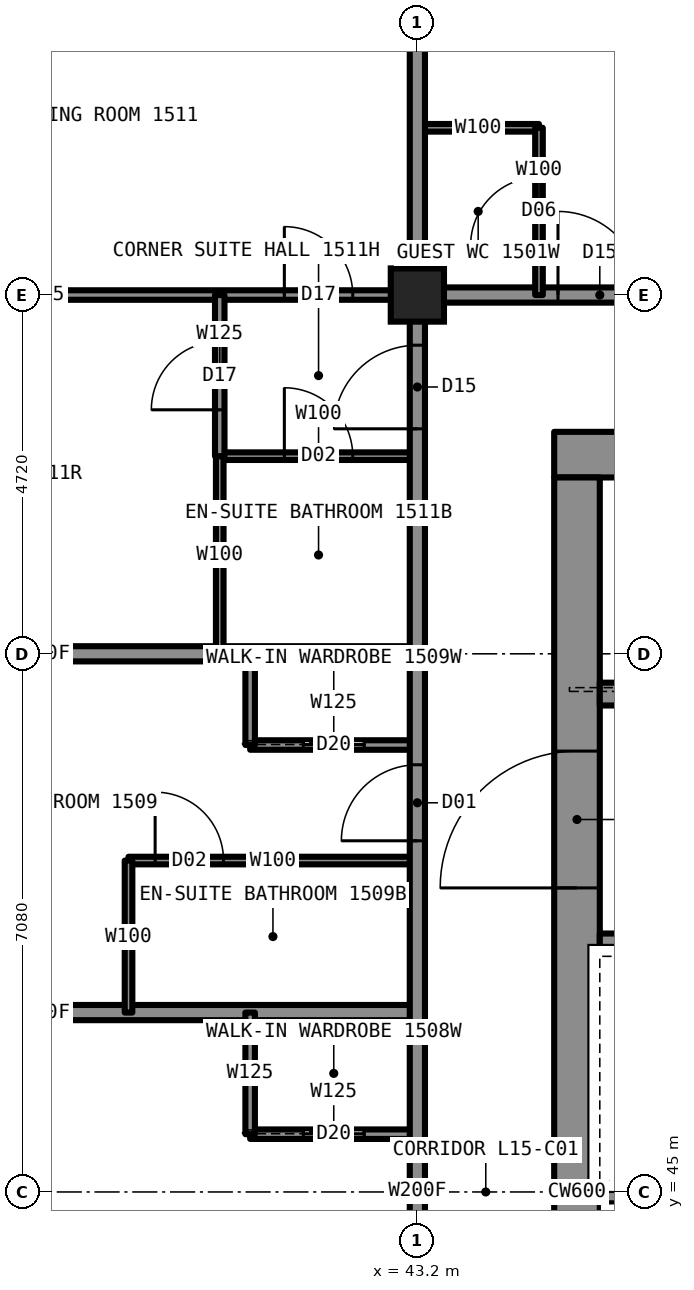
"""IFC4 building model, lengths in metres.
Left out: names, types, materials, properties, quantities, classifications, styles, units other than length and angle.
Written with IfcOpenShell. Run it as: python <this file> out.ifc"""

import sys

from ifc_helpers import new_model, si_unit, direction, frame, frame_2d, origin, origin_2d, place, context, subcontext, project, spatial, rectangle, hollow_rectangle, extrude, element, fill, save


model = new_model("IFC4")
c1 = context("Model", 3, precision=1e-05, world=origin(), true_north=direction((0.0, 1.0)))
c2 = subcontext(c1, "Body", "Model", "MODEL_VIEW")
j1 = project(units=[si_unit("LENGTHUNIT", "METRE"), si_unit("PLANEANGLEUNIT", "RADIAN")], contexts=[c1])
p1 = place(None, origin())
s1 = spatial("IfcSite", under=j1, at=p1, CompositionType="ELEMENT")
p2 = place(p1, origin())
s2 = spatial("IfcBuilding", under=s1, at=p2, CompositionType="ELEMENT")
p3 = place(p2, frame((0.0, 0.0, 60.0)))
s3 = spatial("IfcBuildingStorey", under=s2, at=p3, CompositionType="ELEMENT", Elevation=60.0)
p4 = place(p3, frame((43.2, 56.8, 0.0), z_axis=(0.0, 0.0, 1.0), x_axis=(1.0, 0.0, 0.0)))
e1 = element("IfcColumn", 1, at=p4, inside=s3, PredefinedType="COLUMN", context=c2, shape_type="SweptSolid", body=[
    extrude(hollow_rectangle(XDim=0.7, YDim=0.7, WallThickness=0.06, at=origin_2d()), origin(), (0.0, 0.0, 1.0), 3.5),
])
p5 = place(p3, frame((45.0, 54.7, 0.0), z_axis=(0.0, 0.0, 1.0), x_axis=(1.0, 0.0, 0.0)))
e2 = element("IfcWall", 2, at=p5, inside=s3, PredefinedType="SHEAR", context=c2, shape_type="SweptSolid", body=[
    extrude(rectangle(XDim=20.0, YDim=0.6, at=frame_2d((10.0, 0.0))), origin(), (0.0, 0.0, 1.0), 3.5),
])
p6 = place(p3, frame((45.3, 35.6, 0.0), z_axis=(0.0, 0.0, 1.0), x_axis=(0.0, 1.0, 0.0)))
e3 = element("IfcWall", 3, at=p6, inside=s3, PredefinedType="SHEAR", context=c2, shape_type="SweptSolid", body=[
    extrude(rectangle(XDim=18.8, YDim=0.6, at=frame_2d((9.4, 0.0))), origin(), (0.0, 0.0, 1.0), 3.5),
])
p7 = place(p6, frame((13.4, 0.0, 0.0)))
e4 = element("IfcOpeningElement", 4, at=p7, cuts=e3, PredefinedType="OPENING", context=c2, shape_type="SweptSolid", body=[
    extrude(rectangle(XDim=1.8, YDim=2.2, at=frame_2d((0.9, 1.1))), frame((0.0, 0.31, 0.0), z_axis=(0.0, -1.0, 0.0), x_axis=(1.0, 0.0, 0.0)), (0.0, 0.0, 1.0), 0.62),
])
p8 = place(p6, frame((3.6, 0.0, 0.0)))
e5 = element("IfcOpeningElement", 5, at=p8, cuts=e3, PredefinedType="OPENING", context=c2, shape_type="SweptSolid", body=[
    extrude(rectangle(XDim=1.8, YDim=2.2, at=frame_2d((0.9, 1.1))), frame((0.0, 0.31, 0.0), z_axis=(0.0, -1.0, 0.0), x_axis=(1.0, 0.0, 0.0)), (0.0, 0.0, 1.0), 0.62),
])
p9 = place(p6, frame((6.4, 0.0, 0.0)))
e6 = element("IfcOpeningElement", 6, at=p9, cuts=e3, PredefinedType="OPENING", context=c2, shape_type="SweptSolid", body=[
    extrude(rectangle(XDim=1.2, YDim=2.2, at=frame_2d((0.6, 1.1))), frame((0.0, 0.31, 0.0), z_axis=(0.0, -1.0, 0.0), x_axis=(1.0, 0.0, 0.0)), (0.0, 0.0, 1.0), 0.62),
])
p10 = place(p3, frame((45.6, 51.55, 0.0), z_axis=(0.0, 0.0, 1.0), x_axis=(1.0, 0.0, 0.0)))
e7 = element("IfcWall", 7, at=p10, inside=s3, PredefinedType="SHEAR", context=c2, shape_type="SweptSolid", body=[
    extrude(rectangle(XDim=18.8, YDim=0.3, at=frame_2d((9.4, 0.0))), origin(), (0.0, 0.0, 1.0), 3.5),
])
p11 = place(p10, frame((0.7, 0.0, 0.0)))
e8 = element("IfcOpeningElement", 8, at=p11, cuts=e7, PredefinedType="OPENING", context=c2, shape_type="SweptSolid", body=[
    extrude(rectangle(XDim=1.1, YDim=2.2, at=frame_2d((0.55, 1.1))), frame((0.0, 0.16, 0.0), z_axis=(0.0, -1.0, 0.0), x_axis=(1.0, 0.0, 0.0)), (0.0, 0.0, 1.0), 0.32),
])
p12 = place(p10, frame((3.4, 0.0, 0.0)))
e9 = element("IfcOpeningElement", 9, at=p12, cuts=e7, PredefinedType="OPENING", context=c2, shape_type="SweptSolid", body=[
    extrude(rectangle(XDim=1.1, YDim=2.2, at=frame_2d((0.55, 1.1))), frame((0.0, 0.16, 0.0), z_axis=(0.0, -1.0, 0.0), x_axis=(1.0, 0.0, 0.0)), (0.0, 0.0, 1.0), 0.32),
])
p13 = place(p10, frame((6.1, 0.0, 0.0)))
e10 = element("IfcOpeningElement", 10, at=p13, cuts=e7, PredefinedType="OPENING", context=c2, shape_type="SweptSolid", body=[
    extrude(rectangle(XDim=1.1, YDim=2.2, at=frame_2d((0.55, 1.1))), frame((0.0, 0.16, 0.0), z_axis=(0.0, -1.0, 0.0), x_axis=(1.0, 0.0, 0.0)), (0.0, 0.0, 1.0), 0.32),
])
p14 = place(p10, frame((8.8, 0.0, 0.0)))
e11 = element("IfcOpeningElement", 11, at=p14, cuts=e7, PredefinedType="OPENING", context=c2, shape_type="SweptSolid", body=[
    extrude(rectangle(XDim=1.1, YDim=2.2, at=frame_2d((0.55, 1.1))), frame((0.0, 0.16, 0.0), z_axis=(0.0, -1.0, 0.0), x_axis=(1.0, 0.0, 0.0)), (0.0, 0.0, 1.0), 0.32),
])
p15 = place(p10, frame((11.6, 0.0, 0.0)))
e12 = element("IfcOpeningElement", 12, at=p15, cuts=e7, PredefinedType="OPENING", context=c2, shape_type="SweptSolid", body=[
    extrude(rectangle(XDim=1.1, YDim=2.2, at=frame_2d((0.55, 1.1))), frame((0.0, 0.16, 0.0), z_axis=(0.0, -1.0, 0.0), x_axis=(1.0, 0.0, 0.0)), (0.0, 0.0, 1.0), 0.32),
])
p16 = place(p10, frame((14.3, 0.0, 0.0)))
e13 = element("IfcOpeningElement", 13, at=p16, cuts=e7, PredefinedType="OPENING", context=c2, shape_type="SweptSolid", body=[
    extrude(rectangle(XDim=1.1, YDim=2.2, at=frame_2d((0.55, 1.1))), frame((0.0, 0.16, 0.0), z_axis=(0.0, -1.0, 0.0), x_axis=(1.0, 0.0, 0.0)), (0.0, 0.0, 1.0), 0.32),
])
p17 = place(p3, frame((45.6, 48.25, 0.0), z_axis=(0.0, 0.0, 1.0), x_axis=(1.0, 0.0, 0.0)))
e14 = element("IfcWall", 14, at=p17, inside=s3, PredefinedType="SHEAR", context=c2, shape_type="SweptSolid", body=[
    extrude(rectangle(XDim=7.1, YDim=0.3, at=frame_2d((3.55, 0.0))), origin(), (0.0, 0.0, 1.0), 3.5),
])
p18 = place(p3, frame((45.6, 45.0, 0.0), z_axis=(0.0, 0.0, 1.0), x_axis=(1.0, 0.0, 0.0)))
e15 = element("IfcWall", 15, at=p18, inside=s3, PredefinedType="SHEAR", context=c2, shape_type="SweptSolid", body=[
    extrude(rectangle(XDim=6.8, YDim=0.3, at=frame_2d((3.4, 0.0))), origin(), (0.0, 0.0, 1.0), 3.5),
])
p19 = place(p3, frame((41.0, 45.76, 0.0), z_axis=(0.0, 0.0, 1.0), x_axis=(1.0, 0.0, 0.0)))
e16 = element("IfcWall", 16, at=p19, inside=s3, PredefinedType="PARTITIONING", context=c2, shape_type="SweptSolid", body=[
    extrude(rectangle(XDim=2.2, YDim=0.125, at=frame_2d((1.1, 0.0))), origin(), (0.0, 0.0, 1.0), 3.33),
])
p20 = place(p19, frame((0.7, 0.0, 0.0)))
e17 = element("IfcOpeningElement", 17, at=p20, cuts=e16, PredefinedType="OPENING", context=c2, shape_type="SweptSolid", body=[
    extrude(rectangle(XDim=0.8, YDim=2.1, at=frame_2d((0.4, 1.05))), frame((0.0, 0.073, 0.0), z_axis=(0.0, -1.0, 0.0), x_axis=(1.0, 0.0, 0.0)), (0.0, 0.0, 1.0), 0.145),
])
p21 = place(p3, frame((43.2, 56.8, 0.0), z_axis=(0.0, 0.0, 1.0), x_axis=(1.0, 0.0, 0.0)))
e18 = element("IfcWall", 18, at=p21, inside=s3, PredefinedType="PARTITIONING", context=c2, shape_type="SweptSolid", body=[
    extrude(rectangle(XDim=23.6, YDim=0.2, at=frame_2d((11.8, 0.0))), origin(), (0.0, 0.0, 1.0), 3.33),
])
p22 = place(p21, frame((1.85, 0.0, 0.0)))
e19 = element("IfcOpeningElement", 19, at=p22, cuts=e18, PredefinedType="OPENING", context=c2, shape_type="SweptSolid", body=[
    extrude(rectangle(XDim=1.1, YDim=2.2, at=frame_2d((0.55, 1.1))), frame((0.0, 0.11, 0.0), z_axis=(0.0, -1.0, 0.0), x_axis=(1.0, 0.0, 0.0)), (0.0, 0.0, 1.0), 0.22),
])
p23 = place(p21, frame((17.16, 0.0, 0.0)))
e20 = element("IfcOpeningElement", 20, at=p23, cuts=e18, PredefinedType="OPENING", context=c2, shape_type="SweptSolid", body=[
    extrude(rectangle(XDim=1.0, YDim=2.2, at=frame_2d((0.5, 1.1))), frame((0.0, 0.11, 0.0), z_axis=(0.0, -1.0, 0.0), x_axis=(1.0, 0.0, 0.0)), (0.0, 0.0, 1.0), 0.22),
])
p24 = place(p3, frame((33.3, 56.8, 0.0), z_axis=(0.0, 0.0, 1.0), x_axis=(1.0, 0.0, 0.0)))
e21 = element("IfcWall", 21, at=p24, inside=s3, PredefinedType="PARTITIONING", context=c2, shape_type="SweptSolid", body=[
    extrude(rectangle(XDim=9.9, YDim=0.125, at=frame_2d((4.95, 0.0))), origin(), (0.0, 0.0, 1.0), 2.573),
])
p25 = place(p24, frame((8.15, 0.0, 0.0)))
e22 = element("IfcOpeningElement", 22, at=p25, cuts=e21, PredefinedType="OPENING", context=c2, shape_type="SweptSolid", body=[
    extrude(rectangle(XDim=0.9, YDim=2.2, at=frame_2d((0.45, 1.1))), frame((0.0, 0.073, 0.0), z_axis=(0.0, -1.0, 0.0), x_axis=(1.0, 0.0, 0.0)), (0.0, 0.0, 1.0), 0.145),
])
p26 = place(p3, frame((43.2, 59.0, 0.0), z_axis=(0.0, 0.0, 1.0), x_axis=(1.0, 0.0, 0.0)))
e23 = element("IfcWall", 23, at=p26, inside=s3, PredefinedType="PARTITIONING", context=c2, shape_type="SweptSolid", body=[
    extrude(rectangle(XDim=1.6, YDim=0.1, at=frame_2d((0.8, 0.0))), origin(), (0.0, 0.0, 1.0), 3.33),
])
p27 = place(p3, frame((33.3, 47.36, 0.0), z_axis=(0.0, 0.0, 1.0), x_axis=(1.0, 0.0, 0.0)))
e24 = element("IfcWall", 24, at=p27, inside=s3, PredefinedType="PARTITIONING", context=c2, shape_type="SweptSolid", body=[
    extrude(rectangle(XDim=9.9, YDim=0.2, at=frame_2d((4.95, 0.0))), origin(), (0.0, 0.0, 1.0), 2.723),
])
p28 = place(p3, frame((39.4, 49.36, 0.0), z_axis=(0.0, 0.0, 1.0), x_axis=(1.0, 0.0, 0.0)))
e25 = element("IfcWall", 25, at=p28, inside=s3, PredefinedType="PARTITIONING", context=c2, shape_type="SweptSolid", body=[
    extrude(rectangle(XDim=3.8, YDim=0.1, at=frame_2d((1.9, 0.0))), origin(), (0.0, 0.0, 1.0), 3.33),
])
p29 = place(p28, frame((0.35, 0.0, 0.0)))
e26 = element("IfcOpeningElement", 26, at=p29, cuts=e25, PredefinedType="OPENING", context=c2, shape_type="SweptSolid", body=[
    extrude(rectangle(XDim=0.9, YDim=2.1, at=frame_2d((0.45, 1.05))), frame((0.0, 0.06, 0.0), z_axis=(0.0, -1.0, 0.0), x_axis=(1.0, 0.0, 0.0)), (0.0, 0.0, 1.0), 0.12),
])
p30 = place(p3, frame((41.0, 50.88, 0.0), z_axis=(0.0, 0.0, 1.0), x_axis=(1.0, 0.0, 0.0)))
e27 = element("IfcWall", 27, at=p30, inside=s3, PredefinedType="PARTITIONING", context=c2, shape_type="SweptSolid", body=[
    extrude(rectangle(XDim=2.2, YDim=0.125, at=frame_2d((1.1, 0.0))), origin(), (0.0, 0.0, 1.0), 3.33),
])
p31 = place(p30, frame((0.7, 0.0, 0.0)))
e28 = element("IfcOpeningElement", 28, at=p31, cuts=e27, PredefinedType="OPENING", context=c2, shape_type="SweptSolid", body=[
    extrude(rectangle(XDim=0.8, YDim=2.1, at=frame_2d((0.4, 1.05))), frame((0.0, 0.073, 0.0), z_axis=(0.0, -1.0, 0.0), x_axis=(1.0, 0.0, 0.0)), (0.0, 0.0, 1.0), 0.145),
])
p32 = place(p3, frame((33.3, 52.08, 0.0), z_axis=(0.0, 0.0, 1.0), x_axis=(1.0, 0.0, 0.0)))
e29 = element("IfcWall", 29, at=p32, inside=s3, PredefinedType="PARTITIONING", context=c2, shape_type="SweptSolid", body=[
    extrude(rectangle(XDim=9.9, YDim=0.2, at=frame_2d((4.95, 0.0))), origin(), (0.0, 0.0, 1.0), 2.573),
])
p33 = place(p3, frame((40.6, 54.68, 0.0), z_axis=(0.0, 0.0, 1.0), x_axis=(1.0, 0.0, 0.0)))
e30 = element("IfcWall", 30, at=p33, inside=s3, PredefinedType="PARTITIONING", context=c2, shape_type="SweptSolid", body=[
    extrude(rectangle(XDim=2.6, YDim=0.1, at=frame_2d((1.3, 0.0))), origin(), (0.0, 0.0, 1.0), 3.33),
])
p34 = place(p33, frame((0.85, 0.0, 0.0)))
e31 = element("IfcOpeningElement", 31, at=p34, cuts=e30, PredefinedType="OPENING", context=c2, shape_type="SweptSolid", body=[
    extrude(rectangle(XDim=0.9, YDim=2.1, at=frame_2d((0.45, 1.05))), frame((0.0, 0.06, 0.0), z_axis=(0.0, -1.0, 0.0), x_axis=(1.0, 0.0, 0.0)), (0.0, 0.0, 1.0), 0.12),
])
p35 = place(p3, frame((44.8, 56.8, 0.0), z_axis=(0.0, 0.0, 1.0), x_axis=(0.0, 1.0, 0.0)))
e32 = element("IfcWall", 32, at=p35, inside=s3, PredefinedType="PARTITIONING", context=c2, shape_type="SweptSolid", body=[
    extrude(rectangle(XDim=2.2, YDim=0.1, at=frame_2d((1.1, 0.0))), origin(), (0.0, 0.0, 1.0), 3.33),
])
p36 = place(p35, frame((0.65, 0.0, 0.0)))
e33 = element("IfcOpeningElement", 33, at=p36, cuts=e32, PredefinedType="OPENING", context=c2, shape_type="SweptSolid", body=[
    extrude(rectangle(XDim=0.9, YDim=2.1, at=frame_2d((0.45, 1.05))), frame((0.0, 0.06, 0.0), z_axis=(0.0, -1.0, 0.0), x_axis=(1.0, 0.0, 0.0)), (0.0, 0.0, 1.0), 0.12),
])
p37 = place(p3, frame((43.2, 33.22, 0.0), z_axis=(0.0, 0.0, 1.0), x_axis=(0.0, 1.0, 0.0)))
e34 = element("IfcWall", 34, at=p37, inside=s3, PredefinedType="PARTITIONING", context=c2, shape_type="SweptSolid", body=[
    extrude(rectangle(XDim=23.58, YDim=0.2, at=frame_2d((11.79, 0.0))), origin(), (0.0, 0.0, 1.0), 3.33),
])
p38 = place(p37, frame((7.7, 0.0, 0.0)))
e35 = element("IfcOpeningElement", 35, at=p38, cuts=e34, PredefinedType="OPENING", context=c2, shape_type="SweptSolid", body=[
    extrude(rectangle(XDim=1.0, YDim=2.2, at=frame_2d((0.5, 1.1))), frame((0.0, 0.11, 0.0), z_axis=(0.0, -1.0, 0.0), x_axis=(1.0, 0.0, 0.0)), (0.0, 0.0, 1.0), 0.22),
])
p39 = place(p37, frame((16.4, 0.0, 0.0)))
e36 = element("IfcOpeningElement", 36, at=p39, cuts=e34, PredefinedType="OPENING", context=c2, shape_type="SweptSolid", body=[
    extrude(rectangle(XDim=1.0, YDim=2.2, at=frame_2d((0.5, 1.1))), frame((0.0, 0.11, 0.0), z_axis=(0.0, -1.0, 0.0), x_axis=(1.0, 0.0, 0.0)), (0.0, 0.0, 1.0), 0.22),
])
p40 = place(p37, frame((21.82, 0.0, 0.0)))
e37 = element("IfcOpeningElement", 37, at=p40, cuts=e34, PredefinedType="OPENING", context=c2, shape_type="SweptSolid", body=[
    extrude(rectangle(XDim=1.1, YDim=2.2, at=frame_2d((0.55, 1.1))), frame((0.0, 0.11, 0.0), z_axis=(0.0, -1.0, 0.0), x_axis=(1.0, 0.0, 0.0)), (0.0, 0.0, 1.0), 0.22),
])
p41 = place(p37, frame((0.64, 0.0, 0.0)))
e38 = element("IfcOpeningElement", 38, at=p41, cuts=e34, PredefinedType="OPENING", context=c2, shape_type="SweptSolid", body=[
    extrude(rectangle(XDim=1.1, YDim=2.2, at=frame_2d((0.55, 1.1))), frame((0.0, 0.11, 0.0), z_axis=(0.0, -1.0, 0.0), x_axis=(1.0, 0.0, 0.0)), (0.0, 0.0, 1.0), 0.22),
])
p42 = place(p3, frame((43.2, 56.8, 0.0), z_axis=(0.0, 0.0, 1.0), x_axis=(0.0, 1.0, 0.0)))
e39 = element("IfcWall", 39, at=p42, inside=s3, PredefinedType="PARTITIONING", context=c2, shape_type="SweptSolid", body=[
    extrude(rectangle(XDim=9.9, YDim=0.2, at=frame_2d((4.95, 0.0))), origin(), (0.0, 0.0, 1.0), 2.573),
])
p43 = place(p3, frame((41.0, 45.76, 0.0), z_axis=(0.0, 0.0, 1.0), x_axis=(0.0, 1.0, 0.0)))
e40 = element("IfcWall", 40, at=p43, inside=s3, PredefinedType="PARTITIONING", context=c2, shape_type="SweptSolid", body=[
    extrude(rectangle(XDim=1.6, YDim=0.125, at=frame_2d((0.8, 0.0))), origin(), (0.0, 0.0, 1.0), 3.33),
])
p44 = place(p3, frame((41.0, 50.88, 0.0), z_axis=(0.0, 0.0, 1.0), x_axis=(0.0, 1.0, 0.0)))
e41 = element("IfcWall", 41, at=p44, inside=s3, PredefinedType="PARTITIONING", context=c2, shape_type="SweptSolid", body=[
    extrude(rectangle(XDim=1.2, YDim=0.125, at=frame_2d((0.6, 0.0))), origin(), (0.0, 0.0, 1.0), 3.33),
])
p45 = place(p3, frame((40.6, 52.08, 0.0), z_axis=(0.0, 0.0, 1.0), x_axis=(0.0, 1.0, 0.0)))
e42 = element("IfcWall", 42, at=p45, inside=s3, PredefinedType="PARTITIONING", context=c2, shape_type="SweptSolid", body=[
    extrude(rectangle(XDim=2.6, YDim=0.1, at=frame_2d((1.3, 0.0))), origin(), (0.0, 0.0, 1.0), 3.33),
])
p46 = place(p3, frame((40.6, 54.68, 0.0), z_axis=(0.0, 0.0, 1.0), x_axis=(0.0, 1.0, 0.0)))
e43 = element("IfcWall", 43, at=p46, inside=s3, PredefinedType="PARTITIONING", context=c2, shape_type="SweptSolid", body=[
    extrude(rectangle(XDim=2.12, YDim=0.125, at=frame_2d((1.06, 0.0))), origin(), (0.0, 0.0, 1.0), 3.33),
])
p47 = place(p46, frame((0.61, 0.0, 0.0)))
e44 = element("IfcOpeningElement", 44, at=p47, cuts=e43, PredefinedType="OPENING", context=c2, shape_type="SweptSolid", body=[
    extrude(rectangle(XDim=0.9, YDim=2.2, at=frame_2d((0.45, 1.1))), frame((0.0, 0.073, 0.0), z_axis=(0.0, -1.0, 0.0), x_axis=(1.0, 0.0, 0.0)), (0.0, 0.0, 1.0), 0.145),
])
p48 = place(p3, frame((39.4, 47.36, 0.0), z_axis=(0.0, 0.0, 1.0), x_axis=(0.0, 1.0, 0.0)))
e45 = element("IfcWall", 45, at=p48, inside=s3, PredefinedType="PARTITIONING", context=c2, shape_type="SweptSolid", body=[
    extrude(rectangle(XDim=2.0, YDim=0.1, at=frame_2d((1.0, 0.0))), origin(), (0.0, 0.0, 1.0), 3.33),
])
p49 = place(p22, origin())
e46 = element("IfcDoor", 46, at=p49, inside=s3, OperationType="SINGLE_SWING_LEFT", PredefinedType="DOOR", context=c2, shape_type="SweptSolid", body=[
    extrude(rectangle(XDim=1.1, YDim=2.2, at=frame_2d((0.55, 1.1))), frame((0.0, 0.025, 0.0), z_axis=(0.0, -1.0, 0.0), x_axis=(1.0, 0.0, 0.0)), (0.0, 0.0, 1.0), 0.05),
])
fill(e19, e46)
p50 = place(p36, origin())
e47 = element("IfcDoor", 47, at=p50, inside=s3, OperationType="SINGLE_SWING_LEFT", PredefinedType="DOOR", context=c2, shape_type="SweptSolid", body=[
    extrude(rectangle(XDim=0.9, YDim=2.1, at=frame_2d((0.45, 1.05))), frame((0.0, 0.025, 0.0), z_axis=(0.0, -1.0, 0.0), x_axis=(1.0, 0.0, 0.0)), (0.0, 0.0, 1.0), 0.05),
])
fill(e33, e47)
p51 = place(p20, origin())
e48 = element("IfcDoor", 48, at=p51, inside=s3, OperationType="SLIDING_TO_LEFT", PredefinedType="DOOR", context=c2, shape_type="SweptSolid", body=[
    extrude(rectangle(XDim=0.8, YDim=2.1, at=frame_2d((0.4, 1.05))), frame((0.0, 0.025, 0.0), z_axis=(0.0, -1.0, 0.0), x_axis=(1.0, 0.0, 0.0)), (0.0, 0.0, 1.0), 0.05),
])
fill(e17, e48)
p52 = place(p39, origin())
e49 = element("IfcDoor", 49, at=p52, inside=s3, OperationType="SINGLE_SWING_LEFT", PredefinedType="DOOR", context=c2, shape_type="SweptSolid", body=[
    extrude(rectangle(XDim=1.0, YDim=2.2, at=frame_2d((0.5, 1.1))), frame((0.0, 0.025, 0.0), z_axis=(0.0, -1.0, 0.0), x_axis=(1.0, 0.0, 0.0)), (0.0, 0.0, 1.0), 0.05),
])
fill(e36, e49)
p53 = place(p29, origin())
e50 = element("IfcDoor", 50, at=p53, inside=s3, OperationType="SINGLE_SWING_RIGHT", PredefinedType="DOOR", context=c2, shape_type="SweptSolid", body=[
    extrude(rectangle(XDim=0.9, YDim=2.1, at=frame_2d((0.45, 1.05))), frame((0.0, 0.025, 0.0), z_axis=(0.0, -1.0, 0.0), x_axis=(1.0, 0.0, 0.0)), (0.0, 0.0, 1.0), 0.05),
])
fill(e26, e50)
p54 = place(p31, origin())
e51 = element("IfcDoor", 51, at=p54, inside=s3, OperationType="SLIDING_TO_LEFT", PredefinedType="DOOR", context=c2, shape_type="SweptSolid", body=[
    extrude(rectangle(XDim=0.8, YDim=2.1, at=frame_2d((0.4, 1.05))), frame((0.0, 0.025, 0.0), z_axis=(0.0, -1.0, 0.0), x_axis=(1.0, 0.0, 0.0)), (0.0, 0.0, 1.0), 0.05),
])
fill(e28, e51)
p55 = place(p25, origin())
e52 = element("IfcDoor", 52, at=p55, inside=s3, OperationType="SINGLE_SWING_LEFT", PredefinedType="DOOR", context=c2, shape_type="SweptSolid", body=[
    extrude(rectangle(XDim=0.9, YDim=2.2, at=frame_2d((0.45, 1.1))), frame((0.0, 0.025, 0.0), z_axis=(0.0, -1.0, 0.0), x_axis=(1.0, 0.0, 0.0)), (0.0, 0.0, 1.0), 0.05),
])
fill(e22, e52)
p56 = place(p34, origin())
e53 = element("IfcDoor", 53, at=p56, inside=s3, OperationType="SINGLE_SWING_RIGHT", PredefinedType="DOOR", context=c2, shape_type="SweptSolid", body=[
    extrude(rectangle(XDim=0.9, YDim=2.1, at=frame_2d((0.45, 1.05))), frame((0.0, 0.025, 0.0), z_axis=(0.0, -1.0, 0.0), x_axis=(1.0, 0.0, 0.0)), (0.0, 0.0, 1.0), 0.05),
])
fill(e31, e53)
p57 = place(p40, origin())
e54 = element("IfcDoor", 54, at=p57, inside=s3, OperationType="SINGLE_SWING_LEFT", PredefinedType="DOOR", context=c2, shape_type="SweptSolid", body=[
    extrude(rectangle(XDim=1.1, YDim=2.2, at=frame_2d((0.55, 1.1))), frame((0.0, 0.025, 0.0), z_axis=(0.0, -1.0, 0.0), x_axis=(1.0, 0.0, 0.0)), (0.0, 0.0, 1.0), 0.05),
])
fill(e37, e54)
p58 = place(p47, origin())
e55 = element("IfcDoor", 55, at=p58, inside=s3, OperationType="SINGLE_SWING_LEFT", PredefinedType="DOOR", context=c2, shape_type="SweptSolid", body=[
    extrude(rectangle(XDim=0.9, YDim=2.2, at=frame_2d((0.45, 1.1))), frame((0.0, 0.025, 0.0), z_axis=(0.0, -1.0, 0.0), x_axis=(1.0, 0.0, 0.0)), (0.0, 0.0, 1.0), 0.05),
])
fill(e44, e55)
p59 = place(p7, origin())
e56 = element("IfcDoor", 56, at=p59, inside=s3, OperationType="DOUBLE_DOOR_SINGLE_SWING", PredefinedType="DOOR", context=c2, shape_type="SweptSolid", body=[
    extrude(rectangle(XDim=1.8, YDim=2.2, at=frame_2d((0.9, 1.1))), frame((0.0, 0.025, 0.0), z_axis=(0.0, -1.0, 0.0), x_axis=(1.0, 0.0, 0.0)), (0.0, 0.0, 1.0), 0.05),
])
fill(e4, e56)
save(model, sys.argv[1])
